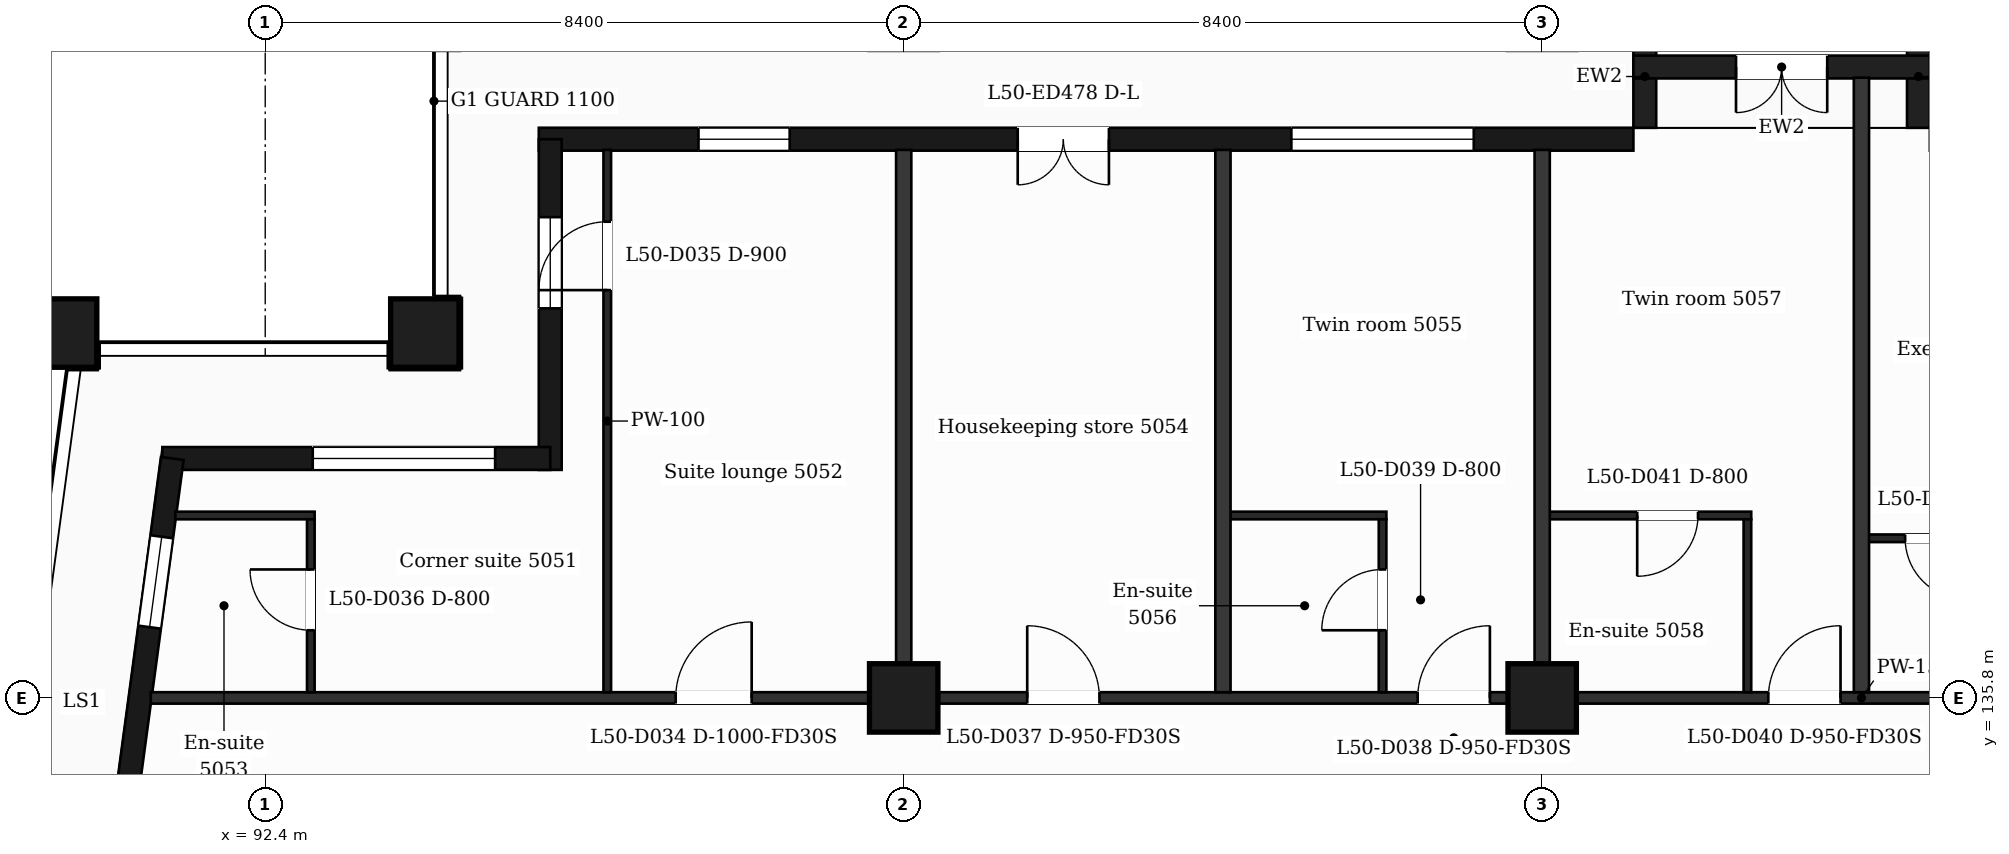
"""IFC4 building model, lengths in metres.
Left out: names, types, materials, properties, quantities, classifications, styles, units other than length and angle.
Written with IfcOpenShell. Run it as: python <this file> out.ifc"""

import sys

from ifc_helpers import new_model, si_unit, direction, frame, frame_2d, origin, origin_2d, place, context, subcontext, project, spatial, rectangle, extrude, element, fill, save


model = new_model("IFC4")
c1 = context("Model", 3, precision=1e-05, world=origin(), true_north=direction((0.0, 1.0)))
c2 = subcontext(c1, "Body", "Model", "MODEL_VIEW")
j1 = project(units=[si_unit("LENGTHUNIT", "METRE"), si_unit("PLANEANGLEUNIT", "RADIAN")], contexts=[c1])
p1 = place(None, origin())
s1 = spatial("IfcSite", under=j1, at=p1, CompositionType="ELEMENT")
p2 = place(p1, origin())
s2 = spatial("IfcBuilding", under=s1, at=p2, CompositionType="ELEMENT")
p3 = place(p2, frame((0.0, 0.0, 209.6)))
s3 = spatial("IfcBuildingStorey", under=s2, at=p3, CompositionType="ELEMENT", Elevation=209.6)
for number, where, z_axis, x_axis in (
    (1, (94.5, 140.6, 0.0), (0.0, 0.0, 1.0), (1.0, 0.0, 0.0)),
    (2, (89.735, 140.6, 0.0), (0.0, 0.0, 1.0), (1.0, 0.0, 0.0)),
    (3, (100.8, 135.8, 0.0), (0.0, 0.0, 1.0), (1.0, 0.0, 0.0)),
    (4, (109.2, 135.8, 0.0), (0.0, 0.0, 1.0), (1.0, 0.0, 0.0)),
):
    element("IfcColumn", number, at=place(p3, frame(where, z_axis=z_axis, x_axis=x_axis)), inside=s3, PredefinedType="COLUMN", context=c2, shape_type="SweptSolid", body=[
        extrude(rectangle(XDim=0.9, YDim=0.9, at=origin_2d()), origin(), (0.0, 0.0, 1.0), 3.7),
    ])
p4 = place(p3, frame((110.4, 143.15, 0.0), z_axis=(0.0, 0.0, 1.0), x_axis=(-1.0, 0.0, 0.0)))
e5 = element("IfcWall", 5, at=p4, inside=s3, PredefinedType="SOLIDWALL", context=c2, shape_type="SweptSolid", body=[
    extrude(rectangle(XDim=14.4, YDim=0.3, at=frame_2d((7.2, 0.0))), origin(), (0.0, 0.0, 1.0), 3.38),
])
p5 = place(p4, frame((2.1, 0.0, 0.9)))
e6 = element("IfcOpeningElement", 6, at=p5, cuts=e5, PredefinedType="OPENING", context=c2, shape_type="SweptSolid", body=[
    extrude(rectangle(XDim=2.4, YDim=2.1, at=frame_2d((1.2, 1.05))), frame((0.0, 0.16, 0.0), z_axis=(0.0, -1.0, 0.0), x_axis=(1.0, 0.0, 0.0)), (0.0, 0.0, 1.0), 0.32),
])
p6 = place(p4, frame((6.9, 0.0, 0.0)))
e7 = element("IfcOpeningElement", 7, at=p6, cuts=e5, PredefinedType="OPENING", context=c2, shape_type="SweptSolid", body=[
    extrude(rectangle(XDim=1.2, YDim=2.4, at=frame_2d((0.6, 1.2))), frame((0.0, 0.16, 0.0), z_axis=(0.0, -1.0, 0.0), x_axis=(1.0, 0.0, 0.0)), (0.0, 0.0, 1.0), 0.32),
])
p7 = place(p4, frame((11.1, 0.0, 0.9)))
e8 = element("IfcOpeningElement", 8, at=p7, cuts=e5, PredefinedType="OPENING", context=c2, shape_type="SweptSolid", body=[
    extrude(rectangle(XDim=1.2, YDim=2.1, at=frame_2d((0.6, 1.05))), frame((0.0, 0.16, 0.0), z_axis=(0.0, -1.0, 0.0), x_axis=(1.0, 0.0, 0.0)), (0.0, 0.0, 1.0), 0.32),
])
for number, where, z_axis, x_axis in (
    (9, (114.15, 143.3, 0.0), (0.0, 0.0, 1.0), (0.0, 1.0, 0.0)),
    (10, (110.55, 143.3, 0.0), (0.0, 0.0, 1.0), (0.0, 1.0, 0.0)),
):
    element("IfcWall", number, at=place(p3, frame(where, z_axis=z_axis, x_axis=x_axis)), inside=s3, PredefinedType="SOLIDWALL", context=c2, shape_type="SweptSolid", body=[
        extrude(rectangle(XDim=1.35, YDim=0.3, at=frame_2d((0.675, 0.0))), origin(), (0.0, 0.0, 1.0), 3.38),
    ])
p8 = place(p3, frame((114.3, 144.1, 0.0), z_axis=(0.0, 0.0, 1.0), x_axis=(-1.0, 0.0, 0.0)))
e11 = element("IfcWall", 11, at=p8, inside=s3, PredefinedType="SOLIDWALL", context=c2, shape_type="SweptSolid", body=[
    extrude(rectangle(XDim=3.9, YDim=0.3, at=frame_2d((1.95, 0.0))), origin(), (0.0, 0.0, 1.0), 3.38),
])
p9 = place(p8, frame((1.35, 0.0, 0.0)))
e12 = element("IfcOpeningElement", 12, at=p9, cuts=e11, PredefinedType="OPENING", context=c2, shape_type="SweptSolid", body=[
    extrude(rectangle(XDim=1.2, YDim=2.4, at=frame_2d((0.6, 1.2))), frame((0.0, 0.16, 0.0), z_axis=(0.0, -1.0, 0.0), x_axis=(1.0, 0.0, 0.0)), (0.0, 0.0, 1.0), 0.32),
])
p10 = place(p3, frame((96.15, 143.15, 0.0), z_axis=(0.0, 0.0, 1.0), x_axis=(0.0, -1.0, 0.0)))
e13 = element("IfcWall", 13, at=p10, inside=s3, PredefinedType="SOLIDWALL", context=c2, shape_type="SweptSolid", body=[
    extrude(rectangle(XDim=4.35, YDim=0.3, at=frame_2d((2.175, 0.0))), origin(), (0.0, 0.0, 1.0), 3.38),
])
p11 = place(p10, frame((1.025, 0.0, 0.9)))
e14 = element("IfcOpeningElement", 14, at=p11, cuts=e13, PredefinedType="OPENING", context=c2, shape_type="SweptSolid", body=[
    extrude(rectangle(XDim=1.2, YDim=2.1, at=frame_2d((0.6, 1.05))), frame((0.0, 0.16, 0.0), z_axis=(0.0, -1.0, 0.0), x_axis=(1.0, 0.0, 0.0)), (0.0, 0.0, 1.0), 0.32),
])
p12 = place(p3, frame((96.15, 138.95, 0.0), z_axis=(0.0, 0.0, 1.0), x_axis=(-1.0, 0.0, 0.0)))
e15 = element("IfcWall", 15, at=p12, inside=s3, PredefinedType="SOLIDWALL", context=c2, shape_type="SweptSolid", body=[
    extrude(rectangle(XDim=5.104, YDim=0.3, at=frame_2d((2.552, 0.0))), origin(), (0.0, 0.0, 1.0), 3.38),
])
p13 = place(p12, frame((0.725, 0.0, 0.9)))
e16 = element("IfcOpeningElement", 16, at=p13, cuts=e15, PredefinedType="OPENING", context=c2, shape_type="SweptSolid", body=[
    extrude(rectangle(XDim=2.4, YDim=2.1, at=frame_2d((1.2, 1.05))), frame((0.0, 0.16, 0.0), z_axis=(0.0, -1.0, 0.0), x_axis=(1.0, 0.0, 0.0)), (0.0, 0.0, 1.0), 0.32),
])
p14 = place(p3, frame((91.177, 138.95, 0.0), z_axis=(0.0, 0.0, 1.0), x_axis=(-0.133426664613, -0.991058689065, 0.0)))
e17 = element("IfcWall", 17, at=p14, inside=s3, PredefinedType="SOLIDWALL", context=c2, shape_type="SweptSolid", body=[
    extrude(rectangle(XDim=6.609, YDim=0.3, at=frame_2d((3.305, 0.0))), origin(), (0.0, 0.0, 1.0), 3.38),
])
p15 = place(p14, frame((1.039, 0.0, 0.9)))
e18 = element("IfcOpeningElement", 18, at=p15, cuts=e17, PredefinedType="OPENING", context=c2, shape_type="SweptSolid", body=[
    extrude(rectangle(XDim=1.2, YDim=2.1, at=frame_2d((0.6, 1.05))), frame((0.0, 0.16, 0.0), z_axis=(0.0, -1.0, 0.0), x_axis=(1.0, 0.0, 0.0)), (0.0, 0.0, 1.0), 0.32),
])
p16 = place(p14, frame((4.294, 0.0, 0.0)))
e19 = element("IfcOpeningElement", 19, at=p16, cuts=e17, PredefinedType="OPENING", context=c2, shape_type="SweptSolid", body=[
    extrude(rectangle(XDim=1.2, YDim=2.4, at=frame_2d((0.6, 1.2))), frame((0.0, 0.16, 0.0), z_axis=(0.0, -1.0, 0.0), x_axis=(1.0, 0.0, 0.0)), (0.0, 0.0, 1.0), 0.32),
])
p17 = place(p3, frame((90.895, 135.8, 0.0), z_axis=(0.0, 0.0, 1.0), x_axis=(1.0, 0.0, 0.0)))
e20 = element("IfcWall", 20, at=p17, inside=s3, PredefinedType="PARTITIONING", context=c2, shape_type="SweptSolid", body=[
    extrude(rectangle(XDim=45.011, YDim=0.15, at=frame_2d((22.505, 0.0))), origin(), (0.0, 0.0, 1.0), 3.38),
])
p18 = place(p17, frame((6.906, 0.0, 0.0)))
e21 = element("IfcOpeningElement", 21, at=p18, cuts=e20, PredefinedType="OPENING", context=c2, shape_type="SweptSolid", body=[
    extrude(rectangle(XDim=1.0, YDim=2.1, at=frame_2d((0.5, 1.05))), frame((0.0, 0.085, 0.0), z_axis=(0.0, -1.0, 0.0), x_axis=(1.0, 0.0, 0.0)), (0.0, 0.0, 1.0), 0.17),
])
p19 = place(p17, frame((11.531, 0.0, 0.0)))
e22 = element("IfcOpeningElement", 22, at=p19, cuts=e20, PredefinedType="OPENING", context=c2, shape_type="SweptSolid", body=[
    extrude(rectangle(XDim=0.95, YDim=2.1, at=frame_2d((0.475, 1.05))), frame((0.0, 0.085, 0.0), z_axis=(0.0, -1.0, 0.0), x_axis=(1.0, 0.0, 0.0)), (0.0, 0.0, 1.0), 0.17),
])
p20 = place(p17, frame((16.667, 0.0, 0.0)))
e23 = element("IfcOpeningElement", 23, at=p20, cuts=e20, PredefinedType="OPENING", context=c2, shape_type="SweptSolid", body=[
    extrude(rectangle(XDim=0.95, YDim=2.1, at=frame_2d((0.475, 1.05))), frame((0.0, 0.085, 0.0), z_axis=(0.0, -1.0, 0.0), x_axis=(1.0, 0.0, 0.0)), (0.0, 0.0, 1.0), 0.17),
])
p21 = place(p17, frame((21.281, 0.0, 0.0)))
e24 = element("IfcOpeningElement", 24, at=p21, cuts=e20, PredefinedType="OPENING", context=c2, shape_type="SweptSolid", body=[
    extrude(rectangle(XDim=0.95, YDim=2.1, at=frame_2d((0.475, 1.05))), frame((0.0, 0.085, 0.0), z_axis=(0.0, -1.0, 0.0), x_axis=(1.0, 0.0, 0.0)), (0.0, 0.0, 1.0), 0.17),
])
p22 = place(p17, frame((28.73, 0.0, 0.0)))
e25 = element("IfcOpeningElement", 25, at=p22, cuts=e20, PredefinedType="OPENING", context=c2, shape_type="SweptSolid", body=[
    extrude(rectangle(XDim=1.0, YDim=2.1, at=frame_2d((0.5, 1.05))), frame((0.0, 0.085, 0.0), z_axis=(0.0, -1.0, 0.0), x_axis=(1.0, 0.0, 0.0)), (0.0, 0.0, 1.0), 0.17),
])
p23 = place(p17, frame((39.814, 0.0, 0.0)))
e26 = element("IfcOpeningElement", 26, at=p23, cuts=e20, PredefinedType="OPENING", context=c2, shape_type="SweptSolid", body=[
    extrude(rectangle(XDim=0.95, YDim=2.1, at=frame_2d((0.475, 1.05))), frame((0.0, 0.085, 0.0), z_axis=(0.0, -1.0, 0.0), x_axis=(1.0, 0.0, 0.0)), (0.0, 0.0, 1.0), 0.17),
])
p24 = place(p3, frame((113.4, 137.9, 0.0), z_axis=(0.0, 0.0, 1.0), x_axis=(1.0, 0.0, 0.0)))
e27 = element("IfcWall", 27, at=p24, inside=s3, PredefinedType="PARTITIONING", context=c2, shape_type="SweptSolid", body=[
    extrude(rectangle(XDim=2.45, YDim=0.1, at=frame_2d((1.225, 0.0))), origin(), (0.0, 0.0, 1.0), 3.38),
])
p25 = place(p24, frame((0.575, 0.0, 0.0)))
e28 = element("IfcOpeningElement", 28, at=p25, cuts=e27, PredefinedType="OPENING", context=c2, shape_type="SweptSolid", body=[
    extrude(rectangle(XDim=0.8, YDim=2.1, at=frame_2d((0.4, 1.05))), frame((0.0, 0.06, 0.0), z_axis=(0.0, -1.0, 0.0), x_axis=(1.0, 0.0, 0.0)), (0.0, 0.0, 1.0), 0.12),
])
p26 = place(p3, frame((91.218, 138.2, 0.0), z_axis=(0.0, 0.0, 1.0), x_axis=(1.0, 0.0, 0.0)))
e29 = element("IfcWall", 29, at=p26, inside=s3, PredefinedType="PARTITIONING", context=c2, shape_type="SweptSolid", body=[
    extrude(rectangle(XDim=1.832, YDim=0.1, at=frame_2d((0.916, 0.0))), origin(), (0.0, 0.0, 1.0), 3.38),
])
p27 = place(p3, frame((105.0, 138.2, 0.0), z_axis=(0.0, 0.0, 1.0), x_axis=(1.0, 0.0, 0.0)))
e30 = element("IfcWall", 30, at=p27, inside=s3, PredefinedType="PARTITIONING", context=c2, shape_type="SweptSolid", body=[
    extrude(rectangle(XDim=2.15, YDim=0.1, at=frame_2d((1.075, 0.0))), origin(), (0.0, 0.0, 1.0), 3.38),
])
p28 = place(p3, frame((109.2, 138.2, 0.0), z_axis=(0.0, 0.0, 1.0), x_axis=(1.0, 0.0, 0.0)))
e31 = element("IfcWall", 31, at=p28, inside=s3, PredefinedType="PARTITIONING", context=c2, shape_type="SweptSolid", body=[
    extrude(rectangle(XDim=2.75, YDim=0.1, at=frame_2d((1.375, 0.0))), origin(), (0.0, 0.0, 1.0), 3.38),
])
p29 = place(p28, frame((1.25, 0.0, 0.0)))
e32 = element("IfcOpeningElement", 32, at=p29, cuts=e31, PredefinedType="OPENING", context=c2, shape_type="SweptSolid", body=[
    extrude(rectangle(XDim=0.8, YDim=2.1, at=frame_2d((0.4, 1.05))), frame((0.0, 0.06, 0.0), z_axis=(0.0, -1.0, 0.0), x_axis=(1.0, 0.0, 0.0)), (0.0, 0.0, 1.0), 0.12),
])
p30 = place(p3, frame((93.0, 135.875, 0.0), z_axis=(0.0, 0.0, 1.0), x_axis=(0.0, 1.0, 0.0)))
e33 = element("IfcWall", 33, at=p30, inside=s3, PredefinedType="PARTITIONING", context=c2, shape_type="SweptSolid", body=[
    extrude(rectangle(XDim=2.275, YDim=0.1, at=frame_2d((1.137, 0.0))), origin(), (0.0, 0.0, 1.0), 3.38),
])
p31 = place(p30, frame((0.815, 0.0, 0.0)))
e34 = element("IfcOpeningElement", 34, at=p31, cuts=e33, PredefinedType="OPENING", context=c2, shape_type="SweptSolid", body=[
    extrude(rectangle(XDim=0.8, YDim=2.1, at=frame_2d((0.4, 1.05))), frame((0.0, 0.06, 0.0), z_axis=(0.0, -1.0, 0.0), x_axis=(1.0, 0.0, 0.0)), (0.0, 0.0, 1.0), 0.12),
])
p32 = place(p3, frame((96.9, 135.875, 0.0), z_axis=(0.0, 0.0, 1.0), x_axis=(0.0, 1.0, 0.0)))
e35 = element("IfcWall", 35, at=p32, inside=s3, PredefinedType="PARTITIONING", context=c2, shape_type="SweptSolid", body=[
    extrude(rectangle(XDim=7.135, YDim=0.1, at=frame_2d((3.567, 0.0))), origin(), (0.0, 0.0, 1.0), 3.38),
])
p33 = place(p32, frame((5.29, 0.0, 0.0)))
e36 = element("IfcOpeningElement", 36, at=p33, cuts=e35, PredefinedType="OPENING", context=c2, shape_type="SweptSolid", body=[
    extrude(rectangle(XDim=0.9, YDim=2.1, at=frame_2d((0.45, 1.05))), frame((0.0, 0.06, 0.0), z_axis=(0.0, -1.0, 0.0), x_axis=(1.0, 0.0, 0.0)), (0.0, 0.0, 1.0), 0.12),
])
for number, where, z_axis, x_axis in (
    (37, (100.8, 135.875, 0.0), (0.0, 0.0, 1.0), (0.0, 1.0, 0.0)),
    (38, (105.0, 135.875, 0.0), (0.0, 0.0, 1.0), (0.0, 1.0, 0.0)),
):
    element("IfcWall", number, at=place(p3, frame(where, z_axis=z_axis, x_axis=x_axis)), inside=s3, PredefinedType="PARTITIONING", context=c2, shape_type="SweptSolid", body=[
        extrude(rectangle(XDim=7.135, YDim=0.2, at=frame_2d((3.567, 0.0))), origin(), (0.0, 0.0, 1.0), 3.38),
    ])
p34 = place(p3, frame((107.1, 135.875, 0.0), z_axis=(0.0, 0.0, 1.0), x_axis=(0.0, 1.0, 0.0)))
e39 = element("IfcWall", 39, at=p34, inside=s3, PredefinedType="PARTITIONING", context=c2, shape_type="SweptSolid", body=[
    extrude(rectangle(XDim=2.275, YDim=0.1, at=frame_2d((1.137, 0.0))), origin(), (0.0, 0.0, 1.0), 3.38),
])
p35 = place(p34, frame((0.815, 0.0, 0.0)))
e40 = element("IfcOpeningElement", 40, at=p35, cuts=e39, PredefinedType="OPENING", context=c2, shape_type="SweptSolid", body=[
    extrude(rectangle(XDim=0.8, YDim=2.1, at=frame_2d((0.4, 1.05))), frame((0.0, 0.06, 0.0), z_axis=(0.0, -1.0, 0.0), x_axis=(1.0, 0.0, 0.0)), (0.0, 0.0, 1.0), 0.12),
])
p36 = place(p3, frame((109.2, 135.875, 0.0), z_axis=(0.0, 0.0, 1.0), x_axis=(0.0, 1.0, 0.0)))
e41 = element("IfcWall", 41, at=p36, inside=s3, PredefinedType="PARTITIONING", context=c2, shape_type="SweptSolid", body=[
    extrude(rectangle(XDim=7.135, YDim=0.2, at=frame_2d((3.567, 0.0))), origin(), (0.0, 0.0, 1.0), 3.38),
])
p37 = place(p3, frame((111.9, 135.875, 0.0), z_axis=(0.0, 0.0, 1.0), x_axis=(0.0, 1.0, 0.0)))
e42 = element("IfcWall", 42, at=p37, inside=s3, PredefinedType="PARTITIONING", context=c2, shape_type="SweptSolid", body=[
    extrude(rectangle(XDim=2.275, YDim=0.1, at=frame_2d((1.137, 0.0))), origin(), (0.0, 0.0, 1.0), 3.38),
])
p38 = place(p3, frame((113.4, 135.875, 0.0), z_axis=(0.0, 0.0, 1.0), x_axis=(0.0, 1.0, 0.0)))
e43 = element("IfcWall", 43, at=p38, inside=s3, PredefinedType="PARTITIONING", context=c2, shape_type="SweptSolid", body=[
    extrude(rectangle(XDim=8.085, YDim=0.2, at=frame_2d((4.042, 0.0))), origin(), (0.0, 0.0, 1.0), 3.38),
])
p39 = place(p5, origin())
e44 = element("IfcWindow", 44, at=p39, inside=s3, PartitioningType="SINGLE_PANEL", PredefinedType="WINDOW", context=c2, shape_type="SweptSolid", body=[
    extrude(rectangle(XDim=2.4, YDim=2.1, at=frame_2d((1.2, 1.05))), frame((0.0, 0.03, 0.0), z_axis=(0.0, -1.0, 0.0), x_axis=(1.0, 0.0, 0.0)), (0.0, 0.0, 1.0), 0.06),
])
fill(e6, e44)
p40 = place(p6, origin())
e45 = element("IfcDoor", 45, at=p40, inside=s3, OperationType="DOUBLE_DOOR_SINGLE_SWING", PredefinedType="DOOR", context=c2, shape_type="SweptSolid", body=[
    extrude(rectangle(XDim=1.2, YDim=2.4, at=frame_2d((0.6, 1.2))), frame((0.0, 0.025, 0.0), z_axis=(0.0, -1.0, 0.0), x_axis=(1.0, 0.0, 0.0)), (0.0, 0.0, 1.0), 0.05),
])
fill(e7, e45)
p41 = place(p7, origin())
e46 = element("IfcWindow", 46, at=p41, inside=s3, PartitioningType="SINGLE_PANEL", PredefinedType="WINDOW", context=c2, shape_type="SweptSolid", body=[
    extrude(rectangle(XDim=1.2, YDim=2.1, at=frame_2d((0.6, 1.05))), frame((0.0, 0.03, 0.0), z_axis=(0.0, -1.0, 0.0), x_axis=(1.0, 0.0, 0.0)), (0.0, 0.0, 1.0), 0.06),
])
fill(e8, e46)
p42 = place(p9, origin())
e47 = element("IfcDoor", 47, at=p42, inside=s3, OperationType="DOUBLE_DOOR_SINGLE_SWING", PredefinedType="DOOR", context=c2, shape_type="SweptSolid", body=[
    extrude(rectangle(XDim=1.2, YDim=2.4, at=frame_2d((0.6, 1.2))), frame((0.0, 0.025, 0.0), z_axis=(0.0, -1.0, 0.0), x_axis=(1.0, 0.0, 0.0)), (0.0, 0.0, 1.0), 0.05),
])
fill(e12, e47)
p43 = place(p11, origin())
e48 = element("IfcWindow", 48, at=p43, inside=s3, PartitioningType="SINGLE_PANEL", PredefinedType="WINDOW", context=c2, shape_type="SweptSolid", body=[
    extrude(rectangle(XDim=1.2, YDim=2.1, at=frame_2d((0.6, 1.05))), frame((0.0, 0.03, 0.0), z_axis=(0.0, -1.0, 0.0), x_axis=(1.0, 0.0, 0.0)), (0.0, 0.0, 1.0), 0.06),
])
fill(e14, e48)
p44 = place(p13, origin())
e49 = element("IfcWindow", 49, at=p44, inside=s3, PartitioningType="SINGLE_PANEL", PredefinedType="WINDOW", context=c2, shape_type="SweptSolid", body=[
    extrude(rectangle(XDim=2.4, YDim=2.1, at=frame_2d((1.2, 1.05))), frame((0.0, 0.03, 0.0), z_axis=(0.0, -1.0, 0.0), x_axis=(1.0, 0.0, 0.0)), (0.0, 0.0, 1.0), 0.06),
])
fill(e16, e49)
p45 = place(p15, origin())
e50 = element("IfcWindow", 50, at=p45, inside=s3, PartitioningType="SINGLE_PANEL", PredefinedType="WINDOW", context=c2, shape_type="SweptSolid", body=[
    extrude(rectangle(XDim=1.2, YDim=2.1, at=frame_2d((0.6, 1.05))), frame((0.0, 0.03, 0.0), z_axis=(0.0, -1.0, 0.0), x_axis=(1.0, 0.0, 0.0)), (0.0, 0.0, 1.0), 0.06),
])
fill(e18, e50)
p46 = place(p18, origin())
e51 = element("IfcDoor", 51, at=p46, inside=s3, OperationType="SINGLE_SWING_RIGHT", PredefinedType="DOOR", context=c2, shape_type="SweptSolid", body=[
    extrude(rectangle(XDim=1.0, YDim=2.1, at=frame_2d((0.5, 1.05))), frame((0.0, 0.025, 0.0), z_axis=(0.0, -1.0, 0.0), x_axis=(1.0, 0.0, 0.0)), (0.0, 0.0, 1.0), 0.05),
])
fill(e21, e51)
p47 = place(p33, origin())
e52 = element("IfcDoor", 52, at=p47, inside=s3, OperationType="SINGLE_SWING_LEFT", PredefinedType="DOOR", context=c2, shape_type="SweptSolid", body=[
    extrude(rectangle(XDim=0.9, YDim=2.1, at=frame_2d((0.45, 1.05))), frame((0.0, 0.025, 0.0), z_axis=(0.0, -1.0, 0.0), x_axis=(1.0, 0.0, 0.0)), (0.0, 0.0, 1.0), 0.05),
])
fill(e36, e52)
p48 = place(p31, origin())
e53 = element("IfcDoor", 53, at=p48, inside=s3, OperationType="SINGLE_SWING_RIGHT", PredefinedType="DOOR", context=c2, shape_type="SweptSolid", body=[
    extrude(rectangle(XDim=0.8, YDim=2.1, at=frame_2d((0.4, 1.05))), frame((0.0, 0.025, 0.0), z_axis=(0.0, -1.0, 0.0), x_axis=(1.0, 0.0, 0.0)), (0.0, 0.0, 1.0), 0.05),
])
fill(e34, e53)
p49 = place(p19, origin())
e54 = element("IfcDoor", 54, at=p49, inside=s3, OperationType="SINGLE_SWING_LEFT", PredefinedType="DOOR", context=c2, shape_type="SweptSolid", body=[
    extrude(rectangle(XDim=0.95, YDim=2.1, at=frame_2d((0.475, 1.05))), frame((0.0, 0.025, 0.0), z_axis=(0.0, -1.0, 0.0), x_axis=(1.0, 0.0, 0.0)), (0.0, 0.0, 1.0), 0.05),
])
fill(e22, e54)
p50 = place(p20, origin())
e55 = element("IfcDoor", 55, at=p50, inside=s3, OperationType="SINGLE_SWING_RIGHT", PredefinedType="DOOR", context=c2, shape_type="SweptSolid", body=[
    extrude(rectangle(XDim=0.95, YDim=2.1, at=frame_2d((0.475, 1.05))), frame((0.0, 0.025, 0.0), z_axis=(0.0, -1.0, 0.0), x_axis=(1.0, 0.0, 0.0)), (0.0, 0.0, 1.0), 0.05),
])
fill(e23, e55)
p51 = place(p35, origin())
e56 = element("IfcDoor", 56, at=p51, inside=s3, OperationType="SINGLE_SWING_LEFT", PredefinedType="DOOR", context=c2, shape_type="SweptSolid", body=[
    extrude(rectangle(XDim=0.8, YDim=2.1, at=frame_2d((0.4, 1.05))), frame((0.0, 0.025, 0.0), z_axis=(0.0, -1.0, 0.0), x_axis=(1.0, 0.0, 0.0)), (0.0, 0.0, 1.0), 0.05),
])
fill(e40, e56)
p52 = place(p21, origin())
e57 = element("IfcDoor", 57, at=p52, inside=s3, OperationType="SINGLE_SWING_RIGHT", PredefinedType="DOOR", context=c2, shape_type="SweptSolid", body=[
    extrude(rectangle(XDim=0.95, YDim=2.1, at=frame_2d((0.475, 1.05))), frame((0.0, 0.025, 0.0), z_axis=(0.0, -1.0, 0.0), x_axis=(1.0, 0.0, 0.0)), (0.0, 0.0, 1.0), 0.05),
])
fill(e24, e57)
p53 = place(p29, origin())
e58 = element("IfcDoor", 58, at=p53, inside=s3, OperationType="SINGLE_SWING_LEFT", PredefinedType="DOOR", context=c2, shape_type="SweptSolid", body=[
    extrude(rectangle(XDim=0.8, YDim=2.1, at=frame_2d((0.4, 1.05))), frame((0.0, 0.025, 0.0), z_axis=(0.0, -1.0, 0.0), x_axis=(1.0, 0.0, 0.0)), (0.0, 0.0, 1.0), 0.05),
])
fill(e32, e58)
p54 = place(p25, origin())
e59 = element("IfcDoor", 59, at=p54, inside=s3, OperationType="SINGLE_SWING_RIGHT", PredefinedType="DOOR", context=c2, shape_type="SweptSolid", body=[
    extrude(rectangle(XDim=0.8, YDim=2.1, at=frame_2d((0.4, 1.05))), frame((0.0, 0.025, 0.0), z_axis=(0.0, -1.0, 0.0), x_axis=(1.0, 0.0, 0.0)), (0.0, 0.0, 1.0), 0.05),
])
fill(e28, e59)
save(model, sys.argv[1])
